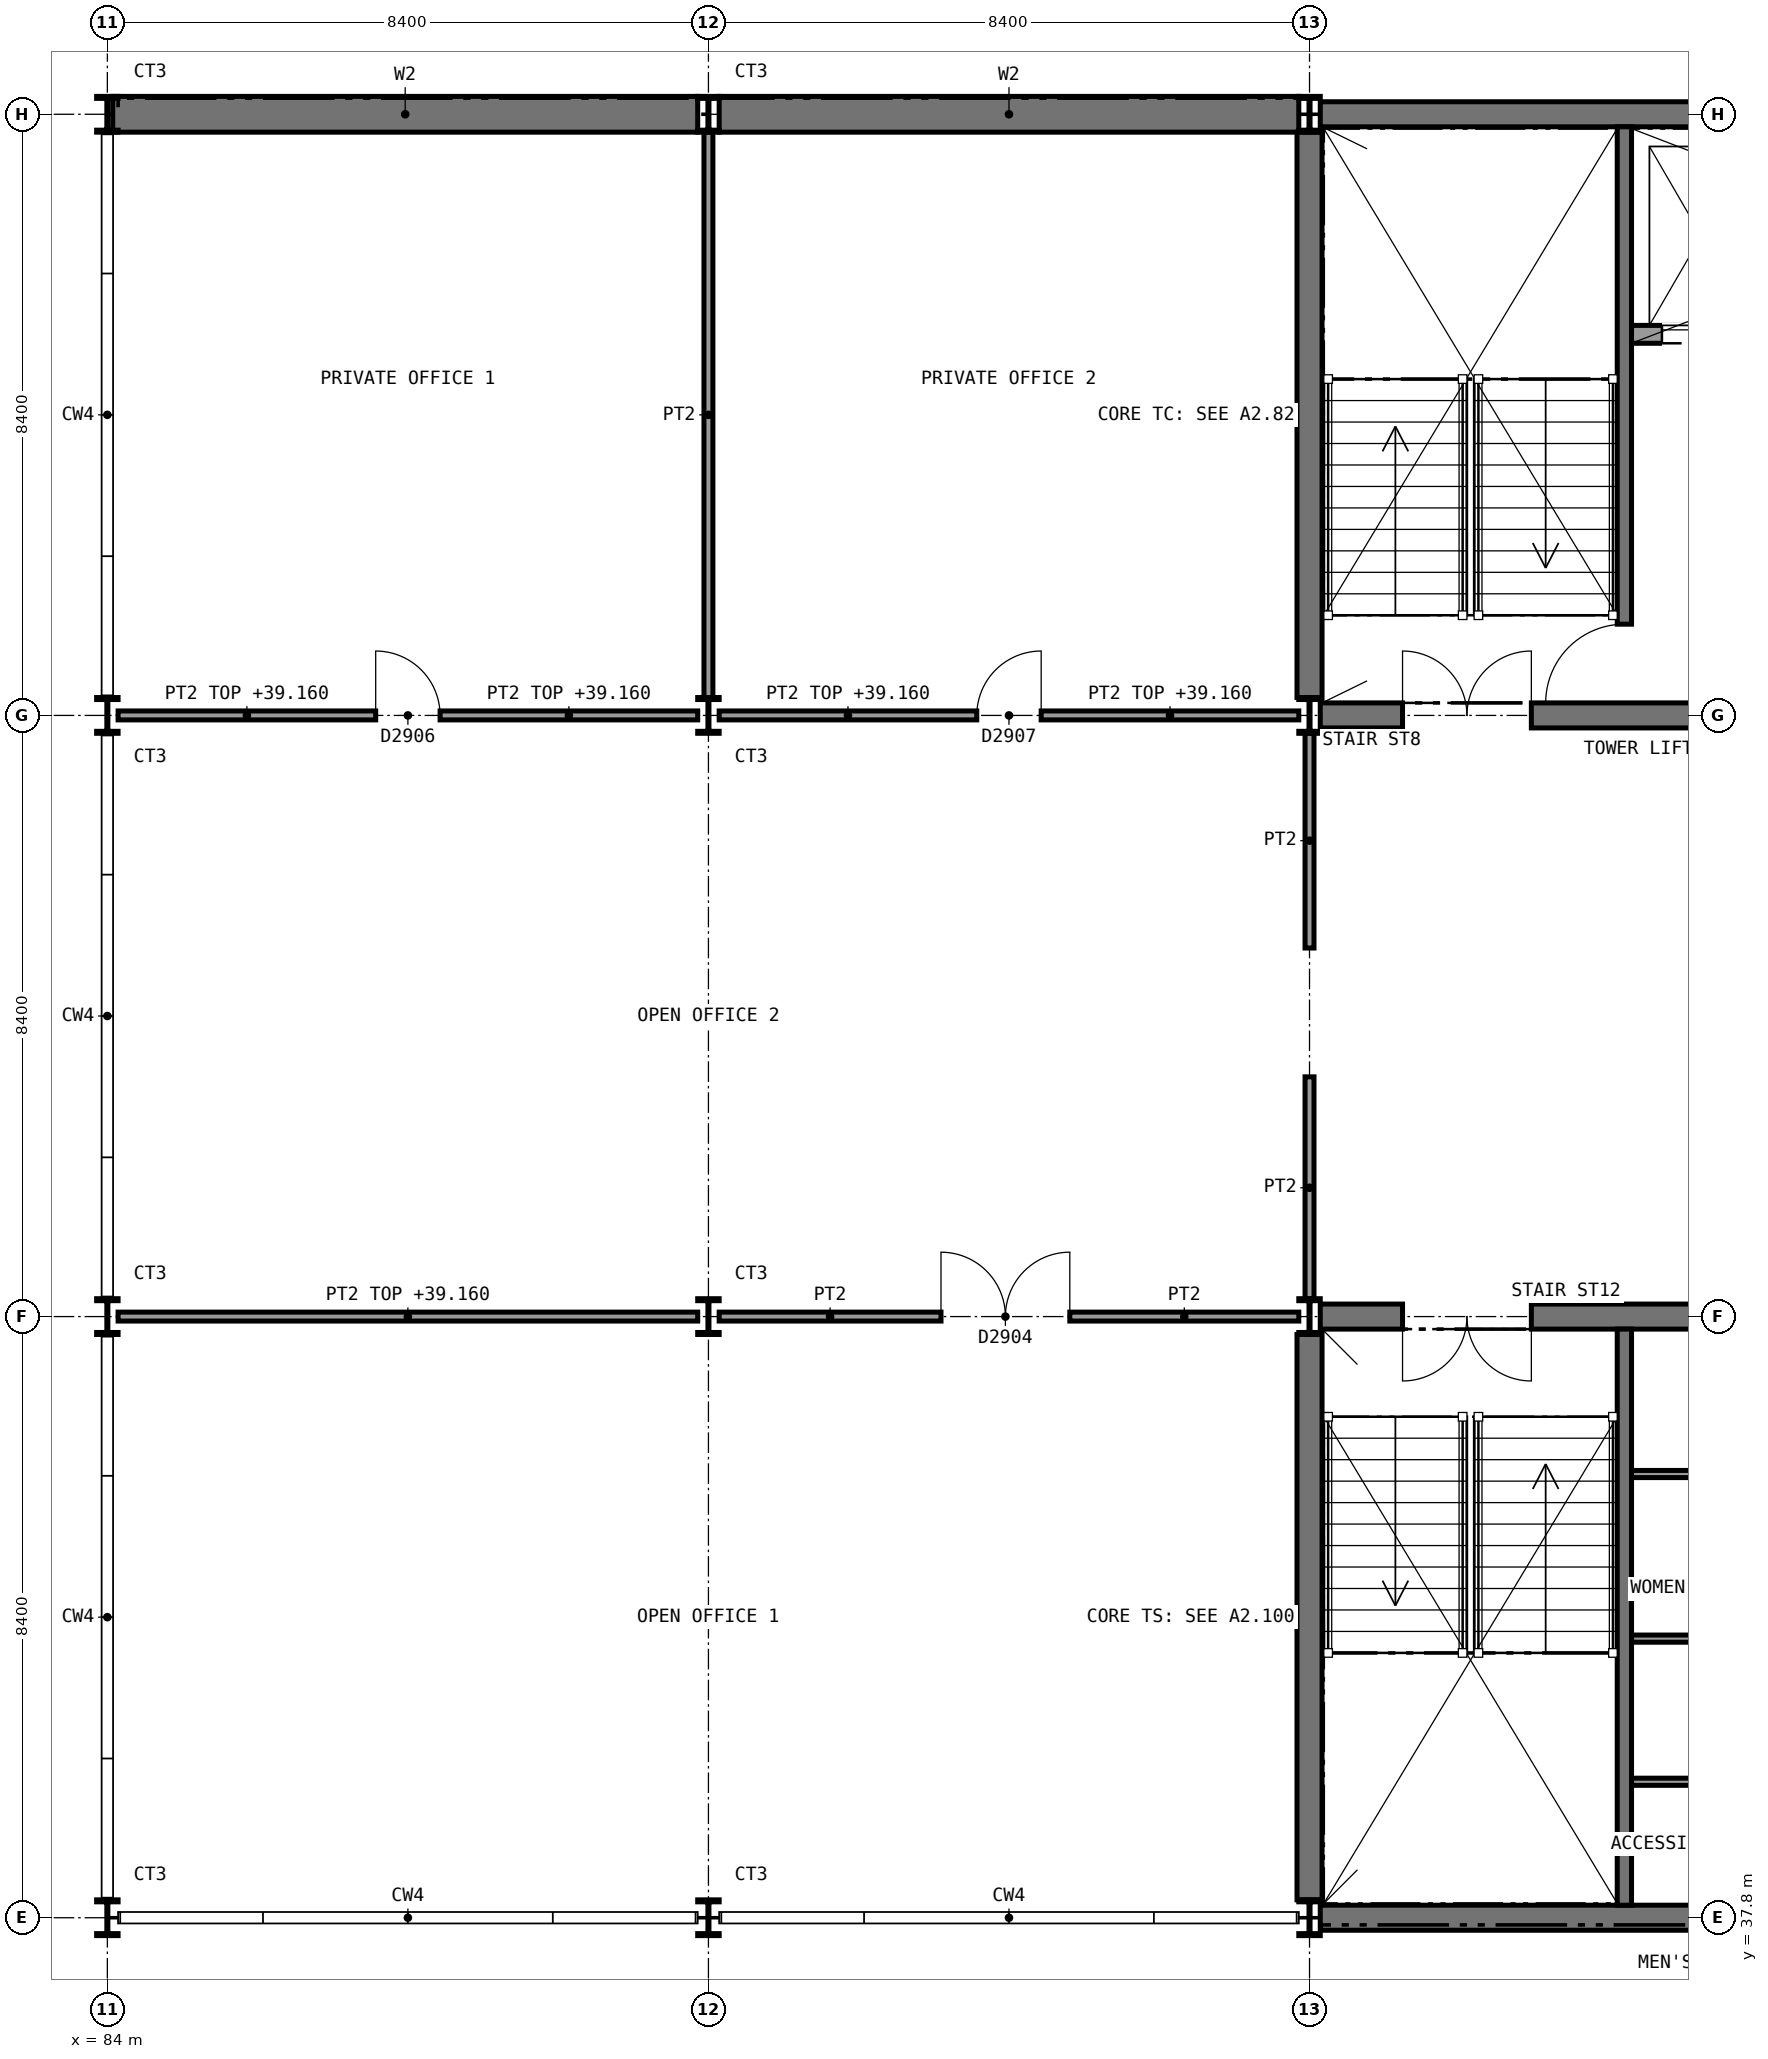
"""IFC4 building model, lengths in metres.
Left out: names, types, materials, properties, quantities, classifications, styles, units other than length and angle.
Written with IfcOpenShell. Run it as: python <this file> out.ifc"""

import sys

from ifc_helpers import new_model, si_unit, direction, frame, frame_2d, origin, origin_2d, place, context, subcontext, project, spatial, rectangle, i_section, extrude, element, fill, save


model = new_model("IFC4")
c1 = context("Model", 3, precision=1e-05, world=origin(), true_north=direction((0.0, 1.0)))
c2 = subcontext(c1, "Body", "Model", "MODEL_VIEW")
j1 = project(units=[si_unit("LENGTHUNIT", "METRE"), si_unit("PLANEANGLEUNIT", "RADIAN")], contexts=[c1])
p1 = place(None, origin())
s1 = spatial("IfcSite", under=j1, at=p1, CompositionType="ELEMENT")
p2 = place(p1, origin())
s2 = spatial("IfcBuilding", under=s1, at=p2, CompositionType="ELEMENT")
p3 = place(p2, frame((0.0, 0.0, 35.6)))
s3 = spatial("IfcBuildingStorey", under=s2, at=p3, CompositionType="ELEMENT", Elevation=35.6)
p4 = place(p3, frame((84.075, 63.0, 0.0), z_axis=(0.0, 0.0, 1.0), x_axis=(1.0, 0.0, 0.0)))
e1 = element("IfcWall", 1, at=p4, inside=s3, PredefinedType="SHEAR", context=c2, shape_type="SweptSolid", body=[
    extrude(rectangle(XDim=8.175, YDim=0.5, at=frame_2d((4.087, 0.0))), origin(), (0.0, 0.0, 1.0), 3.85),
])
p5 = place(p3, frame((92.55, 63.0, 0.0), z_axis=(0.0, 0.0, 1.0), x_axis=(1.0, 0.0, 0.0)))
e2 = element("IfcWall", 2, at=p5, inside=s3, PredefinedType="SHEAR", context=c2, shape_type="SweptSolid", body=[
    extrude(rectangle(XDim=8.1, YDim=0.5, at=frame_2d((4.05, 0.0))), origin(), (0.0, 0.0, 1.0), 3.85),
])
p6 = place(p3, frame((100.95, 63.0, 0.0), z_axis=(0.0, 0.0, 1.0), x_axis=(1.0, 0.0, 0.0)))
e3 = element("IfcWall", 3, at=p6, inside=s3, PredefinedType="SHEAR", context=c2, shape_type="SweptSolid", body=[
    extrude(rectangle(XDim=16.4, YDim=0.35, at=frame_2d((8.2, 0.0))), origin(), (0.0, 0.0, 1.0), 3.85),
])
p7 = place(p3, frame((100.95, 54.6, 0.0), z_axis=(0.0, 0.0, 1.0), x_axis=(1.0, 0.0, 0.0)))
e4 = element("IfcWall", 4, at=p7, inside=s3, PredefinedType="SHEAR", context=c2, shape_type="SweptSolid", body=[
    extrude(rectangle(XDim=16.4, YDim=0.35, at=frame_2d((8.2, 0.0))), origin(), (0.0, 0.0, 1.0), 3.85),
])
p8 = place(p7, frame((1.15, 0.0, 0.0)))
e5 = element("IfcOpeningElement", 5, at=p8, cuts=e4, PredefinedType="OPENING", context=c2, shape_type="SweptSolid", body=[
    extrude(rectangle(XDim=1.8, YDim=2.1, at=frame_2d((0.9, 1.05))), frame((0.0, 0.185, 0.0), z_axis=(0.0, -1.0, 0.0), x_axis=(1.0, 0.0, 0.0)), (0.0, 0.0, 1.0), 0.37),
])
p9 = place(p7, frame((13.55, 0.0, 0.0)))
e6 = element("IfcOpeningElement", 6, at=p9, cuts=e4, PredefinedType="OPENING", context=c2, shape_type="SweptSolid", body=[
    extrude(rectangle(XDim=1.8, YDim=2.1, at=frame_2d((0.9, 1.05))), frame((0.0, 0.185, 0.0), z_axis=(0.0, -1.0, 0.0), x_axis=(1.0, 0.0, 0.0)), (0.0, 0.0, 1.0), 0.37),
])
p10 = place(p7, frame((7.05, 0.0, 0.0)))
e7 = element("IfcOpeningElement", 7, at=p10, cuts=e4, PredefinedType="OPENING", context=c2, shape_type="SweptSolid", body=[
    extrude(rectangle(XDim=2.4, YDim=2.4, at=frame_2d((1.2, 1.2))), frame((0.0, 0.185, 0.0), z_axis=(0.0, -1.0, 0.0), x_axis=(1.0, 0.0, 0.0)), (0.0, 0.0, 1.0), 0.37),
])
p11 = place(p3, frame((100.8, 54.85, 0.0), z_axis=(0.0, 0.0, 1.0), x_axis=(0.0, 1.0, 0.0)))
e8 = element("IfcWall", 8, at=p11, inside=s3, PredefinedType="SHEAR", context=c2, shape_type="SweptSolid", body=[
    extrude(rectangle(XDim=7.9, YDim=0.35, at=frame_2d((3.95, 0.0))), origin(), (0.0, 0.0, 1.0), 3.85),
])
p12 = place(p3, frame((100.95, 37.8, 0.0), z_axis=(0.0, 0.0, 1.0), x_axis=(1.0, 0.0, 0.0)))
e9 = element("IfcWall", 9, at=p12, inside=s3, PredefinedType="SHEAR", context=c2, shape_type="SweptSolid", body=[
    extrude(rectangle(XDim=8.1, YDim=0.35, at=frame_2d((4.05, 0.0))), origin(), (0.0, 0.0, 1.0), 3.85),
])
p13 = place(p3, frame((100.95, 46.2, 0.0), z_axis=(0.0, 0.0, 1.0), x_axis=(1.0, 0.0, 0.0)))
e10 = element("IfcWall", 10, at=p13, inside=s3, PredefinedType="SHEAR", context=c2, shape_type="SweptSolid", body=[
    extrude(rectangle(XDim=8.1, YDim=0.35, at=frame_2d((4.05, 0.0))), origin(), (0.0, 0.0, 1.0), 3.85),
])
p14 = place(p13, frame((1.15, 0.0, 0.0)))
e11 = element("IfcOpeningElement", 11, at=p14, cuts=e10, PredefinedType="OPENING", context=c2, shape_type="SweptSolid", body=[
    extrude(rectangle(XDim=1.8, YDim=2.1, at=frame_2d((0.9, 1.05))), frame((0.0, 0.185, 0.0), z_axis=(0.0, -1.0, 0.0), x_axis=(1.0, 0.0, 0.0)), (0.0, 0.0, 1.0), 0.37),
])
p15 = place(p13, frame((5.6, 0.0, 0.0)))
e12 = element("IfcOpeningElement", 12, at=p15, cuts=e10, PredefinedType="OPENING", context=c2, shape_type="SweptSolid", body=[
    extrude(rectangle(XDim=1.2, YDim=2.1, at=frame_2d((0.6, 1.05))), frame((0.0, 0.185, 0.0), z_axis=(0.0, -1.0, 0.0), x_axis=(1.0, 0.0, 0.0)), (0.0, 0.0, 1.0), 0.37),
])
p16 = place(p3, frame((100.8, 38.05, 0.0), z_axis=(0.0, 0.0, 1.0), x_axis=(0.0, 1.0, 0.0)))
e13 = element("IfcWall", 13, at=p16, inside=s3, PredefinedType="SHEAR", context=c2, shape_type="SweptSolid", body=[
    extrude(rectangle(XDim=7.9, YDim=0.35, at=frame_2d((3.95, 0.0))), origin(), (0.0, 0.0, 1.0), 3.85),
])
for number, where, z_axis, x_axis in (
    (14, (84.0, 37.8, 0.0), (0.0, 0.0, 1.0), (1.0, 0.0, 0.0)),
    (15, (84.0, 46.2, 0.0), (0.0, 0.0, 1.0), (1.0, 0.0, 0.0)),
    (16, (84.0, 54.6, 0.0), (0.0, 0.0, 1.0), (1.0, 0.0, 0.0)),
    (17, (84.0, 63.0, 0.0), (0.0, 0.0, 1.0), (1.0, 0.0, 0.0)),
    (18, (92.4, 37.8, 0.0), (0.0, 0.0, 1.0), (1.0, 0.0, 0.0)),
    (19, (92.4, 46.2, 0.0), (0.0, 0.0, 1.0), (1.0, 0.0, 0.0)),
    (20, (92.4, 54.6, 0.0), (0.0, 0.0, 1.0), (1.0, 0.0, 0.0)),
    (21, (92.4, 63.0, 0.0), (0.0, 0.0, 1.0), (1.0, 0.0, 0.0)),
    (22, (100.8, 37.8, 0.0), (0.0, 0.0, 1.0), (1.0, 0.0, 0.0)),
    (23, (100.8, 46.2, 0.0), (0.0, 0.0, 1.0), (1.0, 0.0, 0.0)),
    (24, (100.8, 54.6, 0.0), (0.0, 0.0, 1.0), (1.0, 0.0, 0.0)),
    (25, (100.8, 63.0, 0.0), (0.0, 0.0, 1.0), (1.0, 0.0, 0.0)),
):
    element("IfcColumn", number, at=place(p3, frame(where, z_axis=z_axis, x_axis=x_axis)), inside=s3, PredefinedType="COLUMN", context=c2, shape_type="SweptSolid", body=[
        extrude(i_section(OverallWidth=0.3, OverallDepth=0.5, WebThickness=0.014, FlangeThickness=0.028, FilletRadius=0.027, at=origin_2d()), origin(), (0.0, 0.0, 1.0), 4.0),
    ])
p17 = place(p3, frame((105.3, 44.0, 0.0), z_axis=(0.0, 0.0, 1.0), x_axis=(1.0, 0.0, 0.0)))
e26 = element("IfcWall", 26, at=p17, inside=s3, PredefinedType="PARTITIONING", context=c2, shape_type="SweptSolid", body=[
    extrude(rectangle(XDim=2.4, YDim=0.1, at=frame_2d((1.2, 0.0))), origin(), (0.0, 0.0, 1.0), 3.78),
])
p18 = place(p17, frame((0.85, 0.0, 0.0)))
e27 = element("IfcOpeningElement", 27, at=p18, cuts=e26, PredefinedType="OPENING", context=c2, shape_type="SweptSolid", body=[
    extrude(rectangle(XDim=0.9, YDim=2.1, at=frame_2d((0.45, 1.05))), frame((0.0, 0.06, 0.0), z_axis=(0.0, -1.0, 0.0), x_axis=(1.0, 0.0, 0.0)), (0.0, 0.0, 1.0), 0.12),
])
for number, where, z_axis, x_axis in (
    (28, (105.3, 41.7, 0.0), (0.0, 0.0, 1.0), (1.0, 0.0, 0.0)),
    (29, (105.3, 39.7, 0.0), (0.0, 0.0, 1.0), (1.0, 0.0, 0.0)),
):
    element("IfcWall", number, at=place(p3, frame(where, z_axis=z_axis, x_axis=x_axis)), inside=s3, PredefinedType="PARTITIONING", context=c2, shape_type="SweptSolid", body=[
        extrude(rectangle(XDim=2.4, YDim=0.1, at=frame_2d((1.2, 0.0))), origin(), (0.0, 0.0, 1.0), 3.78),
    ])
p19 = place(p3, frame((84.15, 46.2, 0.0), z_axis=(0.0, 0.0, 1.0), x_axis=(1.0, 0.0, 0.0)))
e30 = element("IfcWall", 30, at=p19, inside=s3, PredefinedType="PARTITIONING", context=c2, shape_type="SweptSolid", body=[
    extrude(rectangle(XDim=8.1, YDim=0.125, at=frame_2d((4.05, 0.0))), origin(), (0.0, 0.0, 1.0), 3.56),
])
p20 = place(p3, frame((92.55, 46.2, 0.0), z_axis=(0.0, 0.0, 1.0), x_axis=(1.0, 0.0, 0.0)))
e31 = element("IfcWall", 31, at=p20, inside=s3, PredefinedType="PARTITIONING", context=c2, shape_type="SweptSolid", body=[
    extrude(rectangle(XDim=8.1, YDim=0.125, at=frame_2d((4.05, 0.0))), origin(), (0.0, 0.0, 1.0), 3.5),
])
p21 = place(p20, frame((3.1, 0.0, 0.0)))
e32 = element("IfcOpeningElement", 32, at=p21, cuts=e31, PredefinedType="OPENING", context=c2, shape_type="SweptSolid", body=[
    extrude(rectangle(XDim=1.8, YDim=2.1, at=frame_2d((0.9, 1.05))), frame((0.0, 0.073, 0.0), z_axis=(0.0, -1.0, 0.0), x_axis=(1.0, 0.0, 0.0)), (0.0, 0.0, 1.0), 0.145),
])
p22 = place(p3, frame((100.8, 46.45, 0.0), z_axis=(0.0, 0.0, 1.0), x_axis=(0.0, 1.0, 0.0)))
e33 = element("IfcWall", 33, at=p22, inside=s3, PredefinedType="PARTITIONING", context=c2, shape_type="SweptSolid", body=[
    extrude(rectangle(XDim=3.1, YDim=0.125, at=frame_2d((1.55, 0.0))), origin(), (0.0, 0.0, 1.0), 3.5),
])
p23 = place(p3, frame((100.8, 51.35, 0.0), z_axis=(0.0, 0.0, 1.0), x_axis=(0.0, 1.0, 0.0)))
e34 = element("IfcWall", 34, at=p23, inside=s3, PredefinedType="PARTITIONING", context=c2, shape_type="SweptSolid", body=[
    extrude(rectangle(XDim=3.0, YDim=0.125, at=frame_2d((1.5, 0.0))), origin(), (0.0, 0.0, 1.0), 3.5),
])
p24 = place(p3, frame((84.15, 54.6, 0.0), z_axis=(0.0, 0.0, 1.0), x_axis=(1.0, 0.0, 0.0)))
e35 = element("IfcWall", 35, at=p24, inside=s3, PredefinedType="PARTITIONING", context=c2, shape_type="SweptSolid", body=[
    extrude(rectangle(XDim=8.1, YDim=0.125, at=frame_2d((4.05, 0.0))), origin(), (0.0, 0.0, 1.0), 3.56),
])
p25 = place(p24, frame((3.6, 0.0, 0.0)))
e36 = element("IfcOpeningElement", 36, at=p25, cuts=e35, PredefinedType="OPENING", context=c2, shape_type="SweptSolid", body=[
    extrude(rectangle(XDim=0.9, YDim=2.1, at=frame_2d((0.45, 1.05))), frame((0.0, 0.073, 0.0), z_axis=(0.0, -1.0, 0.0), x_axis=(1.0, 0.0, 0.0)), (0.0, 0.0, 1.0), 0.145),
])
p26 = place(p3, frame((92.55, 54.6, 0.0), z_axis=(0.0, 0.0, 1.0), x_axis=(1.0, 0.0, 0.0)))
e37 = element("IfcWall", 37, at=p26, inside=s3, PredefinedType="PARTITIONING", context=c2, shape_type="SweptSolid", body=[
    extrude(rectangle(XDim=8.1, YDim=0.125, at=frame_2d((4.05, 0.0))), origin(), (0.0, 0.0, 1.0), 3.56),
])
p27 = place(p26, frame((3.6, 0.0, 0.0)))
e38 = element("IfcOpeningElement", 38, at=p27, cuts=e37, PredefinedType="OPENING", context=c2, shape_type="SweptSolid", body=[
    extrude(rectangle(XDim=0.9, YDim=2.1, at=frame_2d((0.45, 1.05))), frame((0.0, 0.073, 0.0), z_axis=(0.0, -1.0, 0.0), x_axis=(1.0, 0.0, 0.0)), (0.0, 0.0, 1.0), 0.145),
])
p28 = place(p3, frame((92.4, 54.85, 0.0), z_axis=(0.0, 0.0, 1.0), x_axis=(0.0, 1.0, 0.0)))
e39 = element("IfcWall", 39, at=p28, inside=s3, PredefinedType="PARTITIONING", context=c2, shape_type="SweptSolid", body=[
    extrude(rectangle(XDim=7.9, YDim=0.125, at=frame_2d((3.95, 0.0))), origin(), (0.0, 0.0, 1.0), 3.5),
])
p29 = place(p3, frame((105.2, 62.825, 0.0), z_axis=(0.0, 0.0, 1.0), x_axis=(0.0, -1.0, 0.0)))
e40 = element("IfcWall", 40, at=p29, inside=s3, PredefinedType="SHEAR", context=c2, shape_type="SweptSolid", body=[
    extrude(rectangle(XDim=8.05, YDim=0.2, at=frame_2d((4.025, 0.0))), origin(), (0.0, 0.0, 1.0), 3.85),
])
p30 = place(p29, frame((6.95, 0.0, 0.0)))
e41 = element("IfcOpeningElement", 41, at=p30, cuts=e40, PredefinedType="OPENING", context=c2, shape_type="SweptSolid", body=[
    extrude(rectangle(XDim=1.11, YDim=2.1, at=frame_2d((0.555, 1.05))), frame((0.0, 0.11, 0.0), z_axis=(0.0, -1.0, 0.0), x_axis=(1.0, 0.0, 0.0)), (0.0, 0.0, 1.0), 0.22),
])
p31 = place(p3, frame((105.3, 59.925, 0.0), z_axis=(0.0, 0.0, 1.0), x_axis=(1.0, 0.0, 0.0)))
e42 = element("IfcWall", 42, at=p31, inside=s3, PredefinedType="SOLIDWALL", context=c2, shape_type="SweptSolid", body=[
    extrude(rectangle(XDim=1.95, YDim=0.25, at=frame_2d((0.975, 0.0))), origin(), (0.0, 0.0, 1.0), 4.0),
])
p32 = place(p31, frame((0.425, 0.0, 0.0)))
e43 = element("IfcOpeningElement", 43, at=p32, cuts=e42, PredefinedType="OPENING", context=c2, shape_type="SweptSolid", body=[
    extrude(rectangle(XDim=1.1, YDim=2.1, at=frame_2d((0.55, 1.05))), frame((0.0, 0.135, 0.0), z_axis=(0.0, -1.0, 0.0), x_axis=(1.0, 0.0, 0.0)), (0.0, 0.0, 1.0), 0.27),
])
p33 = place(p3, frame((105.2, 37.975, 0.0), z_axis=(0.0, 0.0, 1.0), x_axis=(0.0, 1.0, 0.0)))
e44 = element("IfcWall", 44, at=p33, inside=s3, PredefinedType="SHEAR", context=c2, shape_type="SweptSolid", body=[
    extrude(rectangle(XDim=8.05, YDim=0.2, at=frame_2d((4.025, 0.0))), origin(), (0.0, 0.0, 1.0), 3.85),
])
p34 = place(p21, origin())
e45 = element("IfcDoor", 45, at=p34, inside=s3, OperationType="DOUBLE_DOOR_SINGLE_SWING", PredefinedType="DOOR", context=c2, shape_type="SweptSolid", body=[
    extrude(rectangle(XDim=1.8, YDim=2.1, at=frame_2d((0.9, 1.05))), frame((0.0, 0.025, 0.0), z_axis=(0.0, -1.0, 0.0), x_axis=(1.0, 0.0, 0.0)), (0.0, 0.0, 1.0), 0.05),
])
fill(e32, e45)
p35 = place(p25, origin())
e46 = element("IfcDoor", 46, at=p35, inside=s3, OperationType="SINGLE_SWING_LEFT", PredefinedType="DOOR", context=c2, shape_type="SweptSolid", body=[
    extrude(rectangle(XDim=0.9, YDim=2.1, at=frame_2d((0.45, 1.05))), frame((0.0, 0.025, 0.0), z_axis=(0.0, -1.0, 0.0), x_axis=(1.0, 0.0, 0.0)), (0.0, 0.0, 1.0), 0.05),
])
fill(e36, e46)
p36 = place(p27, origin())
e47 = element("IfcDoor", 47, at=p36, inside=s3, OperationType="SINGLE_SWING_RIGHT", PredefinedType="DOOR", context=c2, shape_type="SweptSolid", body=[
    extrude(rectangle(XDim=0.9, YDim=2.1, at=frame_2d((0.45, 1.05))), frame((0.0, 0.025, 0.0), z_axis=(0.0, -1.0, 0.0), x_axis=(1.0, 0.0, 0.0)), (0.0, 0.0, 1.0), 0.05),
])
fill(e38, e47)
p37 = place(p30, frame((1.1, 0.0, 0.0), z_axis=(0.0, 0.0, 1.0), x_axis=(-1.0, 0.0, 0.0)))
e48 = element("IfcDoor", 48, at=p37, inside=s3, OperationType="SINGLE_SWING_LEFT", PredefinedType="DOOR", context=c2, shape_type="SweptSolid", body=[
    extrude(rectangle(XDim=1.1, YDim=2.1, at=frame_2d((0.55, 1.05))), frame((0.0, 0.025, 0.0), z_axis=(0.0, -1.0, 0.0), x_axis=(1.0, 0.0, 0.0)), (0.0, 0.0, 1.0), 0.05),
])
fill(e41, e48)
p38 = place(p32, frame((1.1, 0.0, 0.0), z_axis=(0.0, 0.0, 1.0), x_axis=(-1.0, 0.0, 0.0)))
e49 = element("IfcDoor", 49, at=p38, inside=s3, OperationType="SLIDING_TO_RIGHT", PredefinedType="DOOR", context=c2, shape_type="SweptSolid", body=[
    extrude(rectangle(XDim=1.1, YDim=2.1, at=frame_2d((0.55, 1.05))), frame((0.0, 0.025, 0.0), z_axis=(0.0, -1.0, 0.0), x_axis=(1.0, 0.0, 0.0)), (0.0, 0.0, 1.0), 0.05),
])
fill(e43, e49)
p39 = place(p8, origin())
e50 = element("IfcDoor", 50, at=p39, inside=s3, OperationType="DOUBLE_DOOR_SINGLE_SWING", PredefinedType="DOOR", context=c2, shape_type="SweptSolid", body=[
    extrude(rectangle(XDim=1.8, YDim=2.1, at=frame_2d((0.9, 1.05))), frame((0.0, 0.025, 0.0), z_axis=(0.0, -1.0, 0.0), x_axis=(1.0, 0.0, 0.0)), (0.0, 0.0, 1.0), 0.05),
])
fill(e5, e50)
p40 = place(p14, frame((1.8, 0.0, 0.0), z_axis=(0.0, 0.0, 1.0), x_axis=(-1.0, 0.0, 0.0)))
e51 = element("IfcDoor", 51, at=p40, inside=s3, OperationType="DOUBLE_DOOR_SINGLE_SWING", PredefinedType="DOOR", context=c2, shape_type="SweptSolid", body=[
    extrude(rectangle(XDim=1.8, YDim=2.1, at=frame_2d((0.9, 1.05))), frame((0.0, 0.025, 0.0), z_axis=(0.0, -1.0, 0.0), x_axis=(1.0, 0.0, 0.0)), (0.0, 0.0, 1.0), 0.05),
])
fill(e11, e51)
save(model, sys.argv[1])
